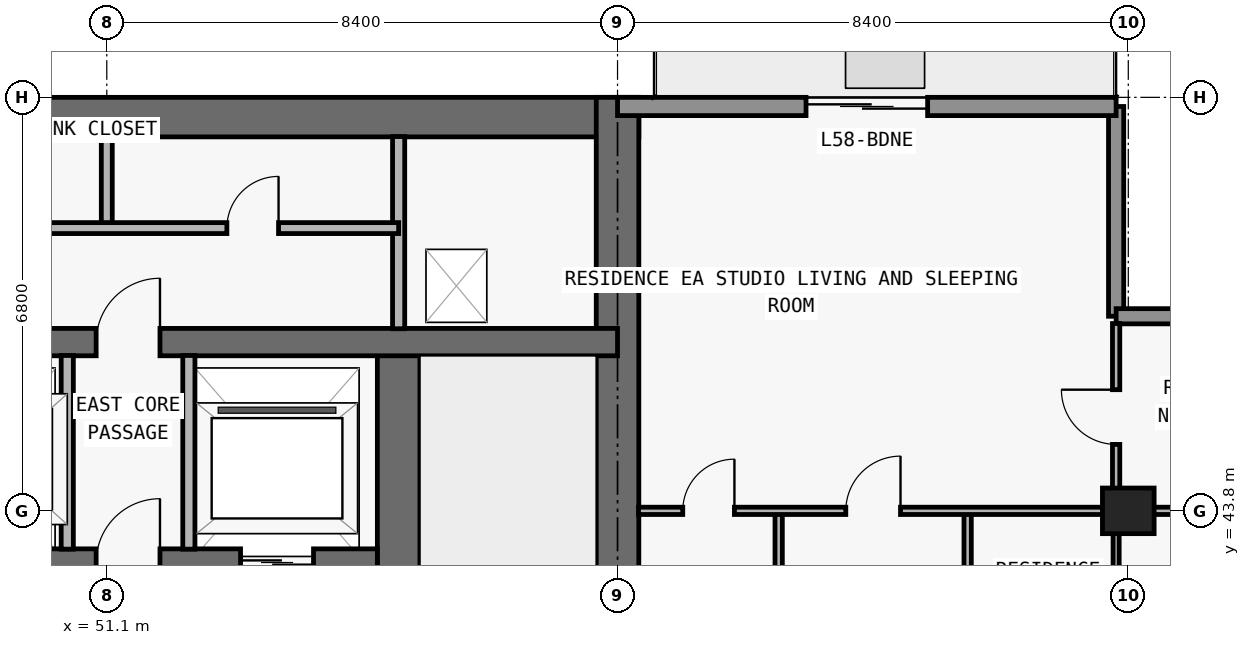
"""IFC4 building model, lengths in metres.
Left out: names, types, materials, properties, quantities, classifications, styles, units other than length and angle.
Written with IfcOpenShell. Run it as: python <this file> out.ifc"""

import sys

from ifc_helpers import new_model, si_unit, direction, frame, frame_2d, origin, origin_2d, place, context, subcontext, project, spatial, rectangle, extrude, element, fill, save


model = new_model("IFC4")
c1 = context("Model", 3, precision=1e-05, world=origin(), true_north=direction((0.0, 1.0)))
c2 = subcontext(c1, "Body", "Model", "MODEL_VIEW")
j1 = project(units=[si_unit("LENGTHUNIT", "METRE"), si_unit("PLANEANGLEUNIT", "RADIAN")], contexts=[c1])
p1 = place(None, origin())
s1 = spatial("IfcSite", under=j1, at=p1, CompositionType="ELEMENT")
p2 = place(p1, origin())
s2 = spatial("IfcBuilding", under=s1, at=p2, CompositionType="ELEMENT")
p3 = place(p2, frame((0.0, 0.0, 208.2)))
s3 = spatial("IfcBuildingStorey", under=s2, at=p3, CompositionType="ELEMENT", Elevation=208.2)
p4 = place(p3, frame((67.9, 43.8, 0.0), z_axis=(0.0, 0.0, 1.0), x_axis=(1.0, 0.0, 0.0)))
e1 = element("IfcColumn", 1, at=p4, inside=s3, PredefinedType="COLUMN", context=c2, shape_type="SweptSolid", body=[
    extrude(rectangle(XDim=0.85, YDim=0.75, at=origin_2d()), origin(), (0.0, 0.0, 1.0), 3.05),
])
p5 = place(p3, frame((17.95, 50.275, 0.0), z_axis=(0.0, 0.0, 1.0), x_axis=(1.0, 0.0, 0.0)))
e2 = element("IfcWall", 2, at=p5, inside=s3, PredefinedType="SHEAR", context=c2, shape_type="SweptSolid", body=[
    extrude(rectangle(XDim=41.9, YDim=0.65, at=frame_2d((20.95, 0.0))), origin(), (0.0, 0.0, 1.0), 3.05),
])
p6 = place(p3, frame((59.5, 36.65, 0.0), z_axis=(0.0, 0.0, 1.0), x_axis=(0.0, 1.0, 0.0)))
e3 = element("IfcWall", 3, at=p6, inside=s3, PredefinedType="SHEAR", context=c2, shape_type="SweptSolid", body=[
    extrude(rectangle(XDim=13.95, YDim=0.7, at=frame_2d((6.975, 0.0))), origin(), (0.0, 0.0, 1.0), 3.05),
])
p7 = place(p3, frame((55.9, 37.0, 0.0), z_axis=(0.0, 0.0, 1.0), x_axis=(0.0, 1.0, 0.0)))
e4 = element("IfcWall", 4, at=p7, inside=s3, PredefinedType="SHEAR", context=c2, shape_type="SweptSolid", body=[
    extrude(rectangle(XDim=9.575, YDim=0.7, at=frame_2d((4.788, 0.0))), origin(), (0.0, 0.0, 1.0), 3.05),
])
p8 = place(p7, frame((0.55, 0.0, 0.0)))
e5 = element("IfcOpeningElement", 5, at=p8, cuts=e4, PredefinedType="OPENING", context=c2, shape_type="SweptSolid", body=[
    extrude(rectangle(XDim=1.1, YDim=2.15, at=frame_2d((0.55, 1.075))), frame((0.0, 0.36, 0.0), z_axis=(0.0, -1.0, 0.0), x_axis=(1.0, 0.0, 0.0)), (0.0, 0.0, 1.0), 0.72),
])
p9 = place(p3, frame((22.25, 42.95, 0.0), z_axis=(0.0, 0.0, 1.0), x_axis=(1.0, 0.0, 0.0)))
e6 = element("IfcWall", 6, at=p9, inside=s3, PredefinedType="SHEAR", context=c2, shape_type="SweptSolid", body=[
    extrude(rectangle(XDim=33.3, YDim=0.45, at=frame_2d((16.65, 0.0))), origin(), (0.0, 0.0, 1.0), 3.05),
])
p10 = place(p9, frame((1.05, 0.0, 0.0)))
e7 = element("IfcOpeningElement", 7, at=p10, cuts=e6, PredefinedType="OPENING", context=c2, shape_type="SweptSolid", body=[
    extrude(rectangle(XDim=1.2, YDim=2.2, at=frame_2d((0.6, 1.1))), frame((0.0, 0.235, 0.0), z_axis=(0.0, -1.0, 0.0), x_axis=(1.0, 0.0, 0.0)), (0.0, 0.0, 1.0), 0.47),
])
p11 = place(p9, frame((31.05, 0.0, 0.0)))
e8 = element("IfcOpeningElement", 8, at=p11, cuts=e6, PredefinedType="OPENING", context=c2, shape_type="SweptSolid", body=[
    extrude(rectangle(XDim=1.2, YDim=2.2, at=frame_2d((0.6, 1.1))), frame((0.0, 0.235, 0.0), z_axis=(0.0, -1.0, 0.0), x_axis=(1.0, 0.0, 0.0)), (0.0, 0.0, 1.0), 0.47),
])
p12 = place(p9, frame((26.45, 0.0, 0.0)))
e9 = element("IfcOpeningElement", 9, at=p12, cuts=e6, PredefinedType="OPENING", context=c2, shape_type="SweptSolid", body=[
    extrude(rectangle(XDim=1.1, YDim=2.2, at=frame_2d((0.55, 1.1))), frame((0.0, 0.235, 0.0), z_axis=(0.0, -1.0, 0.0), x_axis=(1.0, 0.0, 0.0)), (0.0, 0.0, 1.0), 0.47),
])
p13 = place(p9, frame((5.95, 0.0, 0.0)))
e10 = element("IfcOpeningElement", 10, at=p13, cuts=e6, PredefinedType="OPENING", context=c2, shape_type="SweptSolid", body=[
    extrude(rectangle(XDim=1.1, YDim=2.2, at=frame_2d((0.55, 1.1))), frame((0.0, 0.235, 0.0), z_axis=(0.0, -1.0, 0.0), x_axis=(1.0, 0.0, 0.0)), (0.0, 0.0, 1.0), 0.47),
])
p14 = place(p9, frame((3.625, 0.0, 0.0)))
e11 = element("IfcOpeningElement", 11, at=p14, cuts=e6, PredefinedType="OPENING", context=c2, shape_type="SweptSolid", body=[
    extrude(rectangle(XDim=1.05, YDim=2.15, at=frame_2d((0.525, 1.075))), frame((0.0, 0.235, 0.0), z_axis=(0.0, -1.0, 0.0), x_axis=(1.0, 0.0, 0.0)), (0.0, 0.0, 1.0), 0.47),
])
p15 = place(p9, frame((28.675, 0.0, 0.0)))
e12 = element("IfcOpeningElement", 12, at=p15, cuts=e6, PredefinedType="OPENING", context=c2, shape_type="SweptSolid", body=[
    extrude(rectangle(XDim=1.05, YDim=2.15, at=frame_2d((0.525, 1.075))), frame((0.0, 0.235, 0.0), z_axis=(0.0, -1.0, 0.0), x_axis=(1.0, 0.0, 0.0)), (0.0, 0.0, 1.0), 0.47),
])
p16 = place(p9, frame((15.225, 0.0, 0.0)))
e13 = element("IfcOpeningElement", 13, at=p16, cuts=e6, PredefinedType="OPENING", context=c2, shape_type="SweptSolid", body=[
    extrude(rectangle(XDim=1.0, YDim=2.2, at=frame_2d((0.5, 1.1))), frame((0.0, 0.235, 0.0), z_axis=(0.0, -1.0, 0.0), x_axis=(1.0, 0.0, 0.0)), (0.0, 0.0, 1.0), 0.47),
])
p17 = place(p9, frame((21.975, 0.0, 0.0)))
e14 = element("IfcOpeningElement", 14, at=p17, cuts=e6, PredefinedType="OPENING", context=c2, shape_type="SweptSolid", body=[
    extrude(rectangle(XDim=1.0, YDim=2.2, at=frame_2d((0.5, 1.1))), frame((0.0, 0.235, 0.0), z_axis=(0.0, -1.0, 0.0), x_axis=(1.0, 0.0, 0.0)), (0.0, 0.0, 1.0), 0.47),
])
p18 = place(p3, frame((18.3, 46.575, 0.0), z_axis=(0.0, 0.0, 1.0), x_axis=(1.0, 0.0, 0.0)))
e15 = element("IfcWall", 15, at=p18, inside=s3, PredefinedType="SHEAR", context=c2, shape_type="SweptSolid", body=[
    extrude(rectangle(XDim=41.2, YDim=0.45, at=frame_2d((20.6, 0.0))), origin(), (0.0, 0.0, 1.0), 3.05),
])
p19 = place(p18, frame((7.575, 0.0, 0.0)))
e16 = element("IfcOpeningElement", 16, at=p19, cuts=e15, PredefinedType="OPENING", context=c2, shape_type="SweptSolid", body=[
    extrude(rectangle(XDim=1.05, YDim=2.15, at=frame_2d((0.525, 1.075))), frame((0.0, 0.235, 0.0), z_axis=(0.0, -1.0, 0.0), x_axis=(1.0, 0.0, 0.0)), (0.0, 0.0, 1.0), 0.47),
])
p20 = place(p18, frame((32.625, 0.0, 0.0)))
e17 = element("IfcOpeningElement", 17, at=p20, cuts=e15, PredefinedType="OPENING", context=c2, shape_type="SweptSolid", body=[
    extrude(rectangle(XDim=1.05, YDim=2.15, at=frame_2d((0.525, 1.075))), frame((0.0, 0.235, 0.0), z_axis=(0.0, -1.0, 0.0), x_axis=(1.0, 0.0, 0.0)), (0.0, 0.0, 1.0), 0.47),
])
p21 = place(p3, frame((67.7, 50.45, 0.0), z_axis=(0.0, 0.0, 1.0), x_axis=(0.0, -1.0, 0.0)))
e18 = element("IfcWall", 18, at=p21, inside=s3, PredefinedType="ELEMENTEDWALL", context=c2, shape_type="SweptSolid", body=[
    extrude(rectangle(XDim=3.45, YDim=0.25, at=frame_2d((1.725, 0.0))), origin(), (0.0, 0.0, 1.0), 3.05),
])
p22 = place(p3, frame((67.7, 47.0, 0.0), z_axis=(0.0, 0.0, 1.0), x_axis=(1.0, 0.0, 0.0)))
e19 = element("IfcWall", 19, at=p22, inside=s3, PredefinedType="ELEMENTEDWALL", context=c2, shape_type="SweptSolid", body=[
    extrude(rectangle(XDim=3.85, YDim=0.25, at=frame_2d((1.925, 0.0))), origin(), (0.0, 0.0, 1.0), 3.05),
])
p23 = place(p3, frame((59.5, 50.45, 0.0), z_axis=(0.0, 0.0, 1.0), x_axis=(1.0, 0.0, 0.0)))
e20 = element("IfcWall", 20, at=p23, inside=s3, PredefinedType="STANDARD", context=c2, shape_type="SweptSolid", body=[
    extrude(rectangle(XDim=8.2, YDim=0.3, at=frame_2d((4.1, 0.0))), origin(), (0.0, 0.0, 1.0), 3.05),
])
p24 = place(p23, frame((3.1, 0.0, 0.0)))
e21 = element("IfcOpeningElement", 21, at=p24, cuts=e20, PredefinedType="OPENING", context=c2, shape_type="SweptSolid", body=[
    extrude(rectangle(XDim=2.0, YDim=2.3, at=frame_2d((1.0, 1.15))), frame((0.0, 0.16, 0.0), z_axis=(0.0, -1.0, 0.0), x_axis=(1.0, 0.0, 0.0)), (0.0, 0.0, 1.0), 0.32),
])
p25 = place(p3, frame((50.45, 43.17, 0.0), z_axis=(0.0, 0.0, 1.0), x_axis=(0.0, 1.0, 0.0)))
e22 = element("IfcWall", 22, at=p25, inside=s3, PredefinedType="PARTITIONING", context=c2, shape_type="SweptSolid", body=[
    extrude(rectangle(XDim=3.185, YDim=0.2, at=frame_2d((1.593, 0.0))), origin(), (0.0, 0.0, 1.0), 3.05),
])
p26 = place(p3, frame((51.1, 48.45, 0.0), z_axis=(0.0, 0.0, 1.0), x_axis=(0.0, 1.0, 0.0)))
e23 = element("IfcWall", 23, at=p26, inside=s3, PredefinedType="PARTITIONING", context=c2, shape_type="SweptSolid", body=[
    extrude(rectangle(XDim=1.505, YDim=0.18, at=frame_2d((0.752, 0.0))), origin(), (0.0, 0.0, 1.0), 3.05),
])
p27 = place(p3, frame((52.45, 43.17, 0.0), z_axis=(0.0, 0.0, 1.0), x_axis=(0.0, 1.0, 0.0)))
e24 = element("IfcWall", 24, at=p27, inside=s3, PredefinedType="PARTITIONING", context=c2, shape_type="SweptSolid", body=[
    extrude(rectangle(XDim=3.185, YDim=0.2, at=frame_2d((1.593, 0.0))), origin(), (0.0, 0.0, 1.0), 3.05),
])
p28 = place(p3, frame((55.9, 46.795, 0.0), z_axis=(0.0, 0.0, 1.0), x_axis=(0.0, 1.0, 0.0)))
e25 = element("IfcWall", 25, at=p28, inside=s3, PredefinedType="PARTITIONING", context=c2, shape_type="SweptSolid", body=[
    extrude(rectangle(XDim=3.16, YDim=0.2, at=frame_2d((1.58, 0.0))), origin(), (0.0, 0.0, 1.0), 3.05),
])
p29 = place(p3, frame((62.15, 37.0, 0.0), z_axis=(0.0, 0.0, 1.0), x_axis=(0.0, 1.0, 0.0)))
e26 = element("IfcWall", 26, at=p29, inside=s3, PredefinedType="PARTITIONING", context=c2, shape_type="SweptSolid", body=[
    extrude(rectangle(XDim=6.8, YDim=0.12, at=frame_2d((3.4, 0.0))), origin(), (0.0, 0.0, 1.0), 3.05),
])
p30 = place(p29, frame((1.207, 0.0, 0.0)))
e27 = element("IfcOpeningElement", 27, at=p30, cuts=e26, PredefinedType="OPENING", context=c2, shape_type="SweptSolid", body=[
    extrude(rectangle(XDim=0.85, YDim=2.1, at=frame_2d((0.425, 1.05))), frame((0.0, 0.07, 0.0), z_axis=(0.0, -1.0, 0.0), x_axis=(1.0, 0.0, 0.0)), (0.0, 0.0, 1.0), 0.14),
])
p31 = place(p3, frame((65.258, 37.0, 0.0), z_axis=(0.0, 0.0, 1.0), x_axis=(0.0, 1.0, 0.0)))
e28 = element("IfcWall", 28, at=p31, inside=s3, PredefinedType="PARTITIONING", context=c2, shape_type="SweptSolid", body=[
    extrude(rectangle(XDim=6.8, YDim=0.12, at=frame_2d((3.4, 0.0))), origin(), (0.0, 0.0, 1.0), 3.05),
])
p32 = place(p31, frame((2.95, 0.0, 0.0)))
e29 = element("IfcOpeningElement", 29, at=p32, cuts=e28, PredefinedType="OPENING", context=c2, shape_type="SweptSolid", body=[
    extrude(rectangle(XDim=0.9, YDim=2.15, at=frame_2d((0.45, 1.075))), frame((0.0, 0.07, 0.0), z_axis=(0.0, -1.0, 0.0), x_axis=(1.0, 0.0, 0.0)), (0.0, 0.0, 1.0), 0.14),
])
p33 = place(p3, frame((67.7, 37.005, 0.0), z_axis=(0.0, 0.0, 1.0), x_axis=(0.0, 1.0, 0.0)))
e30 = element("IfcWall", 30, at=p33, inside=s3, PredefinedType="MOVABLE", context=c2, shape_type="SweptSolid", body=[
    extrude(rectangle(XDim=6.795, YDim=0.1, at=frame_2d((3.397, 0.0))), origin(), (0.0, 0.0, 1.0), 2.263),
])
p34 = place(p33, frame((2.948, 0.0, 0.0)))
e31 = element("IfcOpeningElement", 31, at=p34, cuts=e30, PredefinedType="OPENING", context=c2, shape_type="SweptSolid", body=[
    extrude(rectangle(XDim=0.9, YDim=2.15, at=frame_2d((0.45, 1.075))), frame((0.0, 0.06, 0.0), z_axis=(0.0, -1.0, 0.0), x_axis=(1.0, 0.0, 0.0)), (0.0, 0.0, 1.0), 0.12),
])
p35 = place(p3, frame((67.7, 43.805, 0.0), z_axis=(0.0, 0.0, 1.0), x_axis=(0.0, 1.0, 0.0)))
e32 = element("IfcWall", 32, at=p35, inside=s3, PredefinedType="PARTITIONING", context=c2, shape_type="SweptSolid", body=[
    extrude(rectangle(XDim=3.075, YDim=0.12, at=frame_2d((1.538, 0.0))), origin(), (0.0, 0.0, 1.0), 3.05),
])
p36 = place(p35, frame((1.087, 0.0, 0.0)))
e33 = element("IfcOpeningElement", 33, at=p36, cuts=e32, PredefinedType="OPENING", context=c2, shape_type="SweptSolid", body=[
    extrude(rectangle(XDim=0.9, YDim=2.15, at=frame_2d((0.45, 1.075))), frame((0.0, 0.07, 0.0), z_axis=(0.0, -1.0, 0.0), x_axis=(1.0, 0.0, 0.0)), (0.0, 0.0, 1.0), 0.14),
])
p37 = place(p3, frame((59.845, 43.8, 0.0), z_axis=(0.0, 0.0, 1.0), x_axis=(1.0, 0.0, 0.0)))
e34 = element("IfcWall", 34, at=p37, inside=s3, PredefinedType="PARTITIONING", context=c2, shape_type="SweptSolid", body=[
    extrude(rectangle(XDim=11.56, YDim=0.12, at=frame_2d((5.78, 0.0))), origin(), (0.0, 0.0, 1.0), 2.418),
])
p38 = place(p37, frame((3.409, 0.0, 0.0)))
e35 = element("IfcOpeningElement", 35, at=p38, cuts=e34, PredefinedType="OPENING", context=c2, shape_type="SweptSolid", body=[
    extrude(rectangle(XDim=0.9, YDim=2.15, at=frame_2d((0.45, 1.075))), frame((0.0, 0.07, 0.0), z_axis=(0.0, -1.0, 0.0), x_axis=(1.0, 0.0, 0.0)), (0.0, 0.0, 1.0), 0.14),
])
p39 = place(p37, frame((0.728, 0.0, 0.0)))
e36 = element("IfcOpeningElement", 36, at=p39, cuts=e34, PredefinedType="OPENING", context=c2, shape_type="SweptSolid", body=[
    extrude(rectangle(XDim=0.85, YDim=2.1, at=frame_2d((0.425, 1.05))), frame((0.0, 0.07, 0.0), z_axis=(0.0, -1.0, 0.0), x_axis=(1.0, 0.0, 0.0)), (0.0, 0.0, 1.0), 0.14),
])
p40 = place(p3, frame((26.7, 48.45, 0.0), z_axis=(0.0, 0.0, 1.0), x_axis=(1.0, 0.0, 0.0)))
e37 = element("IfcWall", 37, at=p40, inside=s3, PredefinedType="PARTITIONING", context=c2, shape_type="SweptSolid", body=[
    extrude(rectangle(XDim=29.2, YDim=0.18, at=frame_2d((14.6, 0.0))), origin(), (0.0, 0.0, 1.0), 3.05),
])
p41 = place(p40, frame((1.75, 0.0, 0.0)))
e38 = element("IfcOpeningElement", 38, at=p41, cuts=e37, PredefinedType="OPENING", context=c2, shape_type="SweptSolid", body=[
    extrude(rectangle(XDim=1.2, YDim=2.2, at=frame_2d((0.6, 1.1))), frame((0.0, 0.1, 0.0), z_axis=(0.0, -1.0, 0.0), x_axis=(1.0, 0.0, 0.0)), (0.0, 0.0, 1.0), 0.2),
])
p42 = place(p40, frame((6.475, 0.0, 0.0)))
e39 = element("IfcOpeningElement", 39, at=p42, cuts=e37, PredefinedType="OPENING", context=c2, shape_type="SweptSolid", body=[
    extrude(rectangle(XDim=1.2, YDim=2.2, at=frame_2d((0.6, 1.1))), frame((0.0, 0.1, 0.0), z_axis=(0.0, -1.0, 0.0), x_axis=(1.0, 0.0, 0.0)), (0.0, 0.0, 1.0), 0.2),
])
p43 = place(p40, frame((14.05, 0.0, 0.0)))
e40 = element("IfcOpeningElement", 40, at=p43, cuts=e37, PredefinedType="OPENING", context=c2, shape_type="SweptSolid", body=[
    extrude(rectangle(XDim=1.0, YDim=2.2, at=frame_2d((0.5, 1.1))), frame((0.0, 0.1, 0.0), z_axis=(0.0, -1.0, 0.0), x_axis=(1.0, 0.0, 0.0)), (0.0, 0.0, 1.0), 0.2),
])
p44 = place(p40, frame((21.425, 0.0, 0.0)))
e41 = element("IfcOpeningElement", 41, at=p44, cuts=e37, PredefinedType="OPENING", context=c2, shape_type="SweptSolid", body=[
    extrude(rectangle(XDim=1.2, YDim=2.2, at=frame_2d((0.6, 1.1))), frame((0.0, 0.1, 0.0), z_axis=(0.0, -1.0, 0.0), x_axis=(1.0, 0.0, 0.0)), (0.0, 0.0, 1.0), 0.2),
])
p45 = place(p40, frame((26.375, 0.0, 0.0)))
e42 = element("IfcOpeningElement", 42, at=p45, cuts=e37, PredefinedType="OPENING", context=c2, shape_type="SweptSolid", body=[
    extrude(rectangle(XDim=0.85, YDim=2.1, at=frame_2d((0.425, 1.05))), frame((0.0, 0.1, 0.0), z_axis=(0.0, -1.0, 0.0), x_axis=(1.0, 0.0, 0.0)), (0.0, 0.0, 1.0), 0.2),
])
p46 = place(p24, origin())
e43 = element("IfcDoor", 43, at=p46, inside=s3, OperationType="DOUBLE_DOOR_SLIDING", PredefinedType="DOOR", context=c2, shape_type="SweptSolid", body=[
    extrude(rectangle(XDim=2.0, YDim=2.3, at=frame_2d((1.0, 1.15))), frame((0.0, 0.025, 0.0), z_axis=(0.0, -1.0, 0.0), x_axis=(1.0, 0.0, 0.0)), (0.0, 0.0, 1.0), 0.05),
])
fill(e21, e43)
p47 = place(p11, origin())
e44 = element("IfcDoor", 44, at=p47, inside=s3, OperationType="DOUBLE_DOOR_SLIDING", PredefinedType="DOOR", context=c2, shape_type="SweptSolid", body=[
    extrude(rectangle(XDim=1.2, YDim=2.2, at=frame_2d((0.6, 1.1))), frame((0.0, 0.025, 0.0), z_axis=(0.0, -1.0, 0.0), x_axis=(1.0, 0.0, 0.0)), (0.0, 0.0, 1.0), 0.05),
])
fill(e8, e44)
p48 = place(p15, origin())
e45 = element("IfcDoor", 45, at=p48, inside=s3, OperationType="SINGLE_SWING_RIGHT", PredefinedType="DOOR", context=c2, shape_type="SweptSolid", body=[
    extrude(rectangle(XDim=1.05, YDim=2.15, at=frame_2d((0.525, 1.075))), frame((0.0, 0.025, 0.0), z_axis=(0.0, -1.0, 0.0), x_axis=(1.0, 0.0, 0.0)), (0.0, 0.0, 1.0), 0.05),
])
fill(e12, e45)
p49 = place(p20, origin())
e46 = element("IfcDoor", 46, at=p49, inside=s3, OperationType="SINGLE_SWING_RIGHT", PredefinedType="DOOR", context=c2, shape_type="SweptSolid", body=[
    extrude(rectangle(XDim=1.05, YDim=2.15, at=frame_2d((0.525, 1.075))), frame((0.0, 0.025, 0.0), z_axis=(0.0, -1.0, 0.0), x_axis=(1.0, 0.0, 0.0)), (0.0, 0.0, 1.0), 0.05),
])
fill(e17, e46)
p50 = place(p45, origin())
e47 = element("IfcDoor", 47, at=p50, inside=s3, OperationType="SINGLE_SWING_RIGHT", PredefinedType="DOOR", context=c2, shape_type="SweptSolid", body=[
    extrude(rectangle(XDim=0.85, YDim=2.1, at=frame_2d((0.425, 1.05))), frame((0.0, 0.025, 0.0), z_axis=(0.0, -1.0, 0.0), x_axis=(1.0, 0.0, 0.0)), (0.0, 0.0, 1.0), 0.05),
])
fill(e42, e47)
p51 = place(p38, origin())
e48 = element("IfcDoor", 48, at=p51, inside=s3, OperationType="SINGLE_SWING_RIGHT", PredefinedType="DOOR", context=c2, shape_type="SweptSolid", body=[
    extrude(rectangle(XDim=0.9, YDim=2.15, at=frame_2d((0.45, 1.075))), frame((0.0, 0.025, 0.0), z_axis=(0.0, -1.0, 0.0), x_axis=(1.0, 0.0, 0.0)), (0.0, 0.0, 1.0), 0.05),
])
fill(e35, e48)
p52 = place(p39, origin())
e49 = element("IfcDoor", 49, at=p52, inside=s3, OperationType="SINGLE_SWING_RIGHT", PredefinedType="DOOR", context=c2, shape_type="SweptSolid", body=[
    extrude(rectangle(XDim=0.85, YDim=2.1, at=frame_2d((0.425, 1.05))), frame((0.0, 0.025, 0.0), z_axis=(0.0, -1.0, 0.0), x_axis=(1.0, 0.0, 0.0)), (0.0, 0.0, 1.0), 0.05),
])
fill(e36, e49)
p53 = place(p36, origin())
e50 = element("IfcDoor", 50, at=p53, inside=s3, OperationType="SINGLE_SWING_RIGHT", PredefinedType="DOOR", context=c2, shape_type="SweptSolid", body=[
    extrude(rectangle(XDim=0.9, YDim=2.15, at=frame_2d((0.45, 1.075))), frame((0.0, 0.025, 0.0), z_axis=(0.0, -1.0, 0.0), x_axis=(1.0, 0.0, 0.0)), (0.0, 0.0, 1.0), 0.05),
])
fill(e33, e50)
save(model, sys.argv[1])
